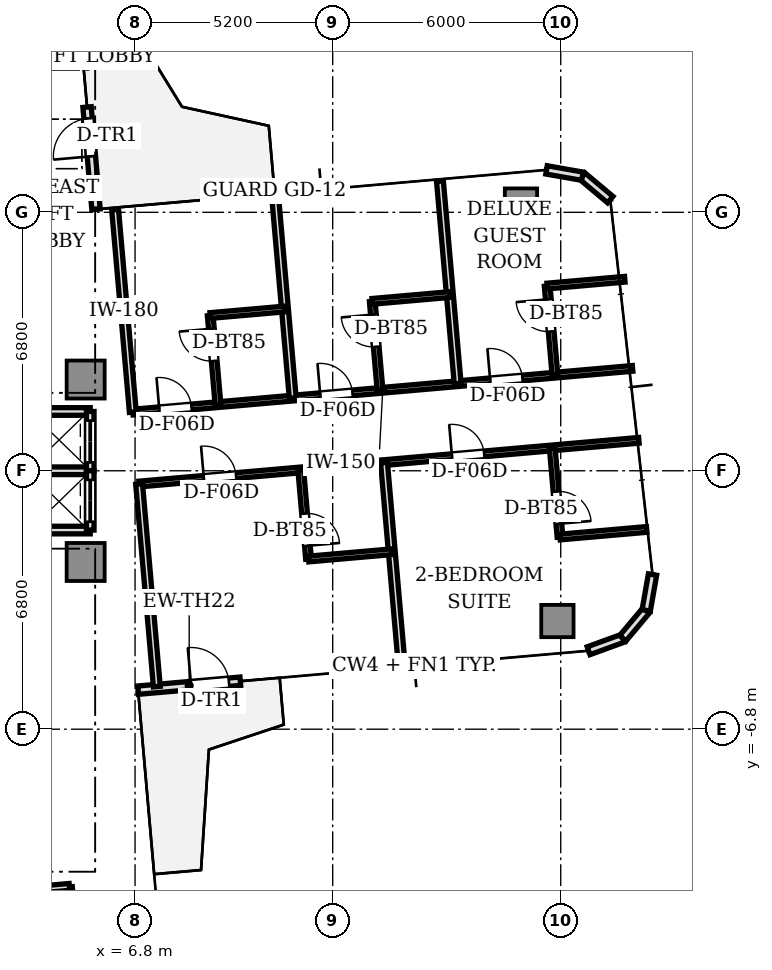
"""IFC4 building model, lengths in metres.
Left out: names, types, materials, properties, quantities, classifications, styles, units other than length and angle.
Written with IfcOpenShell. Run it as: python <this file> out.ifc"""

import sys

from ifc_helpers import new_model, si_unit, direction, frame, frame_2d, origin, origin_2d, place, context, subcontext, project, spatial, rectangle, extrude, source, transform, mapped, element, fill, save


model = new_model("IFC4")
c1 = context("Model", 3, precision=1e-05, world=origin(), true_north=direction((0.0, 1.0)))
c2 = subcontext(c1, "Body", "Model", "MODEL_VIEW")
j1 = project(units=[si_unit("LENGTHUNIT", "METRE"), si_unit("PLANEANGLEUNIT", "RADIAN")], contexts=[c1])
p1 = place(None, origin())
s1 = spatial("IfcSite", under=j1, at=p1, CompositionType="ELEMENT")
p2 = place(p1, origin())
s2 = spatial("IfcBuilding", under=s1, at=p2, CompositionType="ELEMENT")
p3 = place(p2, frame((0.0, 0.0, 167.35)))
s3 = spatial("IfcBuildingStorey", under=s2, at=p3, CompositionType="ELEMENT", Elevation=167.35)
m1 = source(origin(), c2, "Body", "SweptSolid", [
    extrude(rectangle(XDim=1.0, YDim=1.0, at=origin_2d()), origin(), (0.0, 0.0, 1.0), 3.05),
])
for number, where, z_axis, x_axis in (
    (1, (5.5, 2.4, 0.0), (0.0, 0.0, 1.0), (1.0, 0.0, 0.0)),
    (2, (5.5, -2.4, 0.0), (0.0, 0.0, 1.0), (1.0, 0.0, 0.0)),
):
    element("IfcColumn", number, at=place(p3, frame(where, z_axis=z_axis, x_axis=x_axis)), inside=s3, PredefinedType="COLUMN", context=c2, shape_type="MappedRepresentation", body=[
        mapped(m1, transform((0.0, 0.0, 0.0), scale=1.0)),
    ])
m2 = source(origin(), c2, "Body", "SweptSolid", [
    extrude(rectangle(XDim=0.85, YDim=0.85, at=origin_2d()), origin(), (0.0, 0.0, 1.0), 3.05),
])
for number, where, z_axis, x_axis in (
    (3, (17.913, -3.954, 0.0), (0.0, 0.0, 1.0), (1.0, 0.0, 0.0)),
    (4, (16.954, 7.004, 0.0), (0.0, 0.0, 1.0), (1.0, 0.0, 0.0)),
):
    element("IfcColumn", number, at=place(p3, frame(where, z_axis=z_axis, x_axis=x_axis)), inside=s3, PredefinedType="COLUMN", context=c2, shape_type="MappedRepresentation", body=[
        mapped(m2, transform((0.0, 0.0, 0.0), scale=1.0)),
    ])
p4 = place(p3, frame((6.879, -5.772, 0.0), z_axis=(0.0, 0.0, 1.0), x_axis=(0.996193619346, 0.087168071984, 0.0)))
e5 = element("IfcWall", 5, at=p4, inside=s3, PredefinedType="STANDARD", context=c2, shape_type="SweptSolid", body=[
    extrude(rectangle(XDim=2.7, YDim=0.22, at=frame_2d((1.35, 0.0))), origin(), (0.0, 0.0, 1.0), 3.05),
])
p5 = place(p4, frame((1.4, 0.0, 0.0)))
e6 = element("IfcOpeningElement", 6, at=p5, cuts=e5, PredefinedType="OPENING", context=c2, shape_type="SweptSolid", body=[
    extrude(rectangle(XDim=1.0, YDim=2.2, at=frame_2d((0.5, 1.1))), frame((0.0, 0.12, 0.0), z_axis=(0.0, -1.0, 0.0), x_axis=(1.0, 0.0, 0.0)), (0.0, 0.0, 1.0), 0.24),
])
p6 = place(p3, frame((18.734, -4.735, 0.0), z_axis=(0.0, 0.0, 1.0), x_axis=(0.939741306239, 0.34188635151, 0.0)))
e7 = element("IfcWall", 7, at=p6, inside=s3, PredefinedType="STANDARD", context=c2, shape_type="SweptSolid", body=[
    extrude(rectangle(XDim=0.958, YDim=0.22, at=frame_2d((0.479, 0.0))), origin(), (0.0, 0.0, 1.0), 3.05),
])
for number, where, z_axis, x_axis in (
    (8, (19.634, -4.408, 0.0), (0.0, 0.0, 1.0), (0.643, 0.766, 0.0)),
    (9, (20.25, -3.674, 0.0), (0.0, 0.0, 1.0), (0.174, 0.985, 0.0)),
):
    element("IfcWall", number, at=place(p3, frame(where, z_axis=z_axis, x_axis=x_axis)), inside=s3, PredefinedType="STANDARD", context=c2, shape_type="SweptSolid", body=[
        extrude(rectangle(XDim=0.958, YDim=0.22, at=frame_2d((0.479, 0.0))), origin(), (0.0, 0.0, 1.0), 3.05),
    ])
p7 = place(p3, frame((19.304, 7.135, 0.0), z_axis=(0.0, 0.0, 1.0), x_axis=(-0.766001159887, 0.642839189107, 0.0)))
e10 = element("IfcWall", 10, at=p7, inside=s3, PredefinedType="STANDARD", context=c2, shape_type="SweptSolid", body=[
    extrude(rectangle(XDim=0.958, YDim=0.22, at=frame_2d((0.479, 0.0))), origin(), (0.0, 0.0, 1.0), 3.05),
])
p8 = place(p3, frame((18.57, 7.75, 0.0), z_axis=(0.0, 0.0, 1.0), x_axis=(-0.984770724397, 0.173858046606, 0.0)))
e11 = element("IfcWall", 11, at=p8, inside=s3, PredefinedType="STANDARD", context=c2, shape_type="SweptSolid", body=[
    extrude(rectangle(XDim=0.958, YDim=0.22, at=frame_2d((0.479, 0.0))), origin(), (0.0, 0.0, 1.0), 3.05),
])
p9 = place(p3, frame((5.772, 6.879, 0.0), z_axis=(0.0, 0.0, 1.0), x_axis=(-0.087168071984, 0.996193619346, 0.0)))
e12 = element("IfcWall", 12, at=p9, inside=s3, PredefinedType="STANDARD", context=c2, shape_type="SweptSolid", body=[
    extrude(rectangle(XDim=2.7, YDim=0.22, at=frame_2d((1.35, 0.0))), origin(), (0.0, 0.0, 1.0), 3.05),
])
p10 = place(p9, frame((1.4, 0.0, 0.0)))
e13 = element("IfcOpeningElement", 13, at=p10, cuts=e12, PredefinedType="OPENING", context=c2, shape_type="SweptSolid", body=[
    extrude(rectangle(XDim=1.0, YDim=2.2, at=frame_2d((0.5, 1.1))), frame((0.0, 0.12, 0.0), z_axis=(0.0, -1.0, 0.0), x_axis=(1.0, 0.0, 0.0)), (0.0, 0.0, 1.0), 0.24),
])
for number, where, z_axis, x_axis in (
    (14, (3.98, 1.56, 0.0), (0.0, 0.0, 1.0), (1.0, 0.0, 0.0)),
    (15, (3.98, -1.56, 0.0), (0.0, 0.0, 1.0), (1.0, 0.0, 0.0)),
    (16, (3.98, 0.0, 0.0), (0.0, 0.0, 1.0), (1.0, 0.0, 0.0)),
):
    element("IfcWall", number, at=place(p3, frame(where, z_axis=z_axis, x_axis=x_axis)), inside=s3, PredefinedType="SOLIDWALL", context=c2, shape_type="SweptSolid", body=[
        extrude(rectangle(XDim=1.64, YDim=0.2, at=frame_2d((0.82, 0.0))), origin(), (0.0, 0.0, 1.0), 2.6),
    ])
p11 = place(p3, frame((5.62, 0.0, 0.0), z_axis=(0.0, 0.0, 1.0), x_axis=(0.0, 1.0, 0.0)))
e17 = element("IfcWall", 17, at=p11, inside=s3, PredefinedType="SOLIDWALL", context=c2, shape_type="SweptSolid", body=[
    extrude(rectangle(XDim=1.56, YDim=0.2, at=frame_2d((0.78, 0.0))), origin(), (0.0, 0.0, 1.0), 2.6),
])
p12 = place(p11, frame((0.22, 0.0, 0.0)))
e18 = element("IfcOpeningElement", 18, at=p12, cuts=e17, PredefinedType="OPENING", context=c2, shape_type="SweptSolid", body=[
    extrude(rectangle(XDim=1.1, YDim=2.2, at=frame_2d((0.55, 1.1))), frame((0.0, 0.11, 0.0), z_axis=(0.0, -1.0, 0.0), x_axis=(1.0, 0.0, 0.0)), (0.0, 0.0, 1.0), 0.22),
])
p13 = place(p3, frame((5.62, -1.56, 0.0), z_axis=(0.0, 0.0, 1.0), x_axis=(0.0, 1.0, 0.0)))
e19 = element("IfcWall", 19, at=p13, inside=s3, PredefinedType="SOLIDWALL", context=c2, shape_type="SweptSolid", body=[
    extrude(rectangle(XDim=1.56, YDim=0.2, at=frame_2d((0.78, 0.0))), origin(), (0.0, 0.0, 1.0), 2.6),
])
p14 = place(p13, frame((0.22, 0.0, 0.0)))
e20 = element("IfcOpeningElement", 20, at=p14, cuts=e19, PredefinedType="OPENING", context=c2, shape_type="SweptSolid", body=[
    extrude(rectangle(XDim=1.1, YDim=2.2, at=frame_2d((0.55, 1.1))), frame((0.0, 0.11, 0.0), z_axis=(0.0, -1.0, 0.0), x_axis=(1.0, 0.0, 0.0)), (0.0, 0.0, 1.0), 0.22),
])
p15 = place(p3, frame((6.741, 1.543, 0.0), z_axis=(0.0, 0.0, 1.0), x_axis=(0.996195062465, 0.087151577845, 0.0)))
e21 = element("IfcWall", 21, at=p15, inside=s3, PredefinedType="PARTITIONING", context=c2, shape_type="SweptSolid", body=[
    extrude(rectangle(XDim=13.2, YDim=0.15, at=frame_2d((6.6, 0.0))), origin(), (0.0, 0.0, 1.0), 2.6),
])
p16 = place(p15, frame((0.7, 0.0, 0.0)))
e22 = element("IfcOpeningElement", 22, at=p16, cuts=e21, PredefinedType="OPENING", context=c2, shape_type="SweptSolid", body=[
    extrude(rectangle(XDim=0.85, YDim=2.1, at=frame_2d((0.425, 1.05))), frame((0.0, 0.085, 0.0), z_axis=(0.0, -1.0, 0.0), x_axis=(1.0, 0.0, 0.0)), (0.0, 0.0, 1.0), 0.17),
])
p17 = place(p15, frame((4.952, 0.0, 0.0)))
e23 = element("IfcOpeningElement", 23, at=p17, cuts=e21, PredefinedType="OPENING", context=c2, shape_type="SweptSolid", body=[
    extrude(rectangle(XDim=0.85, YDim=2.1, at=frame_2d((0.425, 1.05))), frame((0.0, 0.085, 0.0), z_axis=(0.0, -1.0, 0.0), x_axis=(1.0, 0.0, 0.0)), (0.0, 0.0, 1.0), 0.17),
])
p18 = place(p15, frame((9.44, 0.0, 0.0)))
e24 = element("IfcOpeningElement", 24, at=p18, cuts=e21, PredefinedType="OPENING", context=c2, shape_type="SweptSolid", body=[
    extrude(rectangle(XDim=0.85, YDim=2.1, at=frame_2d((0.425, 1.05))), frame((0.0, 0.085, 0.0), z_axis=(0.0, -1.0, 0.0), x_axis=(1.0, 0.0, 0.0)), (0.0, 0.0, 1.0), 0.17),
])
p19 = place(p3, frame((6.907, -0.349, 0.0), z_axis=(0.0, 0.0, 1.0), x_axis=(0.996195062465, 0.087151577845, 0.0)))
e25 = element("IfcWall", 25, at=p19, inside=s3, PredefinedType="PARTITIONING", context=c2, shape_type="SweptSolid", body=[
    extrude(rectangle(XDim=13.2, YDim=0.15, at=frame_2d((6.6, 0.0))), origin(), (0.0, 0.0, 1.0), 2.6),
])
p20 = place(p19, frame((1.71, 0.0, 0.0)))
e26 = element("IfcOpeningElement", 26, at=p20, cuts=e25, PredefinedType="OPENING", context=c2, shape_type="SweptSolid", body=[
    extrude(rectangle(XDim=0.85, YDim=2.1, at=frame_2d((0.425, 1.05))), frame((0.0, 0.085, 0.0), z_axis=(0.0, -1.0, 0.0), x_axis=(1.0, 0.0, 0.0)), (0.0, 0.0, 1.0), 0.17),
])
p21 = place(p19, frame((8.264, 0.0, 0.0)))
e27 = element("IfcOpeningElement", 27, at=p21, cuts=e25, PredefinedType="OPENING", context=c2, shape_type="SweptSolid", body=[
    extrude(rectangle(XDim=0.85, YDim=2.1, at=frame_2d((0.425, 1.05))), frame((0.0, 0.085, 0.0), z_axis=(0.0, -1.0, 0.0), x_axis=(1.0, 0.0, 0.0)), (0.0, 0.0, 1.0), 0.17),
])
for number, where, z_axis, x_axis in (
    (28, (6.741, 1.543, 0.0), (0.0, 0.0, 1.0), (-0.087, 0.996, 0.0)),
    (29, (7.373, -5.679, 0.0), (0.0, 0.0, 1.0), (-0.087, 0.996, 0.0)),
    (30, (10.949, 1.912, 0.0), (0.0, 0.0, 1.0), (-0.087, 0.996, 0.0)),
):
    element("IfcWall", number, at=place(p3, frame(where, z_axis=z_axis, x_axis=x_axis)), inside=s3, PredefinedType="PARTITIONING", context=c2, shape_type="SweptSolid", body=[
        extrude(rectangle(XDim=5.35, YDim=0.18, at=frame_2d((2.675, 0.0))), origin(), (0.0, 0.0, 1.0), 2.6),
    ])
p22 = place(p3, frame((8.983, 1.74, 0.0), z_axis=(0.0, 0.0, 1.0), x_axis=(-0.087224846905, 0.996188649846, 0.0)))
e31 = element("IfcWall", 31, at=p22, inside=s3, PredefinedType="PARTITIONING", context=c2, shape_type="SweptSolid", body=[
    extrude(rectangle(XDim=2.354, YDim=0.15, at=frame_2d((1.177, 0.0))), origin(), (0.0, 0.0, 1.0), 2.6),
])
p23 = place(p22, frame((1.154, 0.0, 0.0)))
e32 = element("IfcOpeningElement", 32, at=p23, cuts=e31, PredefinedType="OPENING", context=c2, shape_type="SweptSolid", body=[
    extrude(rectangle(XDim=0.85, YDim=2.1, at=frame_2d((0.425, 1.05))), frame((0.0, 0.085, 0.0), z_axis=(0.0, -1.0, 0.0), x_axis=(1.0, 0.0, 0.0)), (0.0, 0.0, 1.0), 0.17),
])
p24 = place(p3, frame((8.777, 4.084, 0.0), z_axis=(0.0, 0.0, 1.0), x_axis=(0.996191703625, 0.087189962887, 0.0)))
e33 = element("IfcWall", 33, at=p24, inside=s3, PredefinedType="PARTITIONING", context=c2, shape_type="SweptSolid", body=[
    extrude(rectangle(XDim=1.974, YDim=0.15, at=frame_2d((0.987, 0.0))), origin(), (0.0, 0.0, 1.0), 2.6),
])
p25 = place(p3, frame((15.289, 2.291, 0.0), z_axis=(0.0, 0.0, 1.0), x_axis=(-0.087161289348, 0.996194212812, 0.0)))
e34 = element("IfcWall", 34, at=p25, inside=s3, PredefinedType="PARTITIONING", context=c2, shape_type="SweptSolid", body=[
    extrude(rectangle(XDim=5.35, YDim=0.18, at=frame_2d((2.675, 0.0))), origin(), (0.0, 0.0, 1.0), 2.6),
])
p26 = place(p3, frame((13.246, 2.113, 0.0), z_axis=(0.0, 0.0, 1.0), x_axis=(-0.087224846905, 0.996188649846, 0.0)))
e35 = element("IfcWall", 35, at=p26, inside=s3, PredefinedType="PARTITIONING", context=c2, shape_type="SweptSolid", body=[
    extrude(rectangle(XDim=2.354, YDim=0.15, at=frame_2d((1.177, 0.0))), origin(), (0.0, 0.0, 1.0), 2.6),
])
p27 = place(p26, frame((1.154, 0.0, 0.0)))
e36 = element("IfcOpeningElement", 36, at=p27, cuts=e35, PredefinedType="OPENING", context=c2, shape_type="SweptSolid", body=[
    extrude(rectangle(XDim=0.85, YDim=2.1, at=frame_2d((0.425, 1.05))), frame((0.0, 0.085, 0.0), z_axis=(0.0, -1.0, 0.0), x_axis=(1.0, 0.0, 0.0)), (0.0, 0.0, 1.0), 0.17),
])
p28 = place(p3, frame((13.041, 4.458, 0.0), z_axis=(0.0, 0.0, 1.0), x_axis=(0.99619307114, 0.087174336889, 0.0)))
e37 = element("IfcWall", 37, at=p28, inside=s3, PredefinedType="PARTITIONING", context=c2, shape_type="SweptSolid", body=[
    extrude(rectangle(XDim=2.05, YDim=0.15, at=frame_2d((1.025, 0.0))), origin(), (0.0, 0.0, 1.0), 2.6),
])
p29 = place(p3, frame((17.849, 2.515, 0.0), z_axis=(0.0, 0.0, 1.0), x_axis=(-0.087121918963, 0.996197656711, 0.0)))
e38 = element("IfcWall", 38, at=p29, inside=s3, PredefinedType="PARTITIONING", context=c2, shape_type="SweptSolid", body=[
    extrude(rectangle(XDim=2.354, YDim=0.15, at=frame_2d((1.177, 0.0))), origin(), (0.0, 0.0, 1.0), 2.6),
])
p30 = place(p29, frame((1.154, 0.0, 0.0)))
e39 = element("IfcOpeningElement", 39, at=p30, cuts=e38, PredefinedType="OPENING", context=c2, shape_type="SweptSolid", body=[
    extrude(rectangle(XDim=0.85, YDim=2.1, at=frame_2d((0.425, 1.05))), frame((0.0, 0.085, 0.0), z_axis=(0.0, -1.0, 0.0), x_axis=(1.0, 0.0, 0.0)), (0.0, 0.0, 1.0), 0.17),
])
p31 = place(p3, frame((17.644, 4.86, 0.0), z_axis=(0.0, 0.0, 1.0), x_axis=(0.99619307114, 0.087174336889, 0.0)))
e40 = element("IfcWall", 40, at=p31, inside=s3, PredefinedType="PARTITIONING", context=c2, shape_type="SweptSolid", body=[
    extrude(rectangle(XDim=2.05, YDim=0.15, at=frame_2d((1.025, 0.0))), origin(), (0.0, 0.0, 1.0), 2.6),
])
p32 = place(p3, frame((13.35, 0.214, 0.0), z_axis=(0.0, 0.0, 1.0), x_axis=(0.087161289348, -0.996194212812, 0.0)))
e41 = element("IfcWall", 41, at=p32, inside=s3, PredefinedType="PARTITIONING", context=c2, shape_type="SweptSolid", body=[
    extrude(rectangle(XDim=5.35, YDim=0.18, at=frame_2d((2.675, 0.0))), origin(), (0.0, 0.0, 1.0), 2.6),
])
p33 = place(p3, frame((11.159, 0.023, 0.0), z_axis=(0.0, 0.0, 1.0), x_axis=(0.087224846905, -0.996188649846, 0.0)))
e42 = element("IfcWall", 42, at=p33, inside=s3, PredefinedType="PARTITIONING", context=c2, shape_type="SweptSolid", body=[
    extrude(rectangle(XDim=2.354, YDim=0.15, at=frame_2d((1.177, 0.0))), origin(), (0.0, 0.0, 1.0), 2.6),
])
p34 = place(p33, frame((1.154, 0.0, 0.0)))
e43 = element("IfcOpeningElement", 43, at=p34, cuts=e42, PredefinedType="OPENING", context=c2, shape_type="SweptSolid", body=[
    extrude(rectangle(XDim=0.85, YDim=2.1, at=frame_2d((0.425, 1.05))), frame((0.0, 0.085, 0.0), z_axis=(0.0, -1.0, 0.0), x_axis=(1.0, 0.0, 0.0)), (0.0, 0.0, 1.0), 0.17),
])
p35 = place(p3, frame((11.365, -2.322, 0.0), z_axis=(0.0, 0.0, 1.0), x_axis=(0.996195042958, 0.087151800816, 0.0)))
e44 = element("IfcWall", 44, at=p35, inside=s3, PredefinedType="PARTITIONING", context=c2, shape_type="SweptSolid", body=[
    extrude(rectangle(XDim=2.199, YDim=0.15, at=frame_2d((1.1, 0.0))), origin(), (0.0, 0.0, 1.0), 2.6),
])
p36 = place(p3, frame((17.776, 0.602, 0.0), z_axis=(0.0, 0.0, 1.0), x_axis=(0.087224846905, -0.996188649846, 0.0)))
e45 = element("IfcWall", 45, at=p36, inside=s3, PredefinedType="PARTITIONING", context=c2, shape_type="SweptSolid", body=[
    extrude(rectangle(XDim=2.354, YDim=0.15, at=frame_2d((1.177, 0.0))), origin(), (0.0, 0.0, 1.0), 2.57),
])
p37 = place(p36, frame((1.154, 0.0, 0.0)))
e46 = element("IfcOpeningElement", 46, at=p37, cuts=e45, PredefinedType="OPENING", context=c2, shape_type="SweptSolid", body=[
    extrude(rectangle(XDim=0.85, YDim=2.1, at=frame_2d((0.425, 1.05))), frame((0.0, 0.085, 0.0), z_axis=(0.0, -1.0, 0.0), x_axis=(1.0, 0.0, 0.0)), (0.0, 0.0, 1.0), 0.17),
])
p38 = place(p3, frame((17.981, -1.743, 0.0), z_axis=(0.0, 0.0, 1.0), x_axis=(0.996196032585, 0.087140488075, 0.0)))
e47 = element("IfcWall", 47, at=p38, inside=s3, PredefinedType="PARTITIONING", context=c2, shape_type="SweptSolid", body=[
    extrude(rectangle(XDim=2.289, YDim=0.15, at=frame_2d((1.145, 0.0))), origin(), (0.0, 0.0, 1.0), 2.6),
])
p39 = place(p3, frame((5.073, -10.949, 0.0), z_axis=(0.0, 0.0, 1.0), x_axis=(0.087199729468, -0.996190848774, 0.0)))
e48 = element("IfcWall", 48, at=p39, inside=s3, PredefinedType="PARTITIONING", context=c2, shape_type="SweptSolid", body=[
    extrude(rectangle(XDim=4.25, YDim=0.15, at=frame_2d((2.125, 0.0))), origin(), (0.0, 0.0, 1.0), 2.6),
])
p40 = place(p39, frame((0.503, 0.0, 0.0)))
e49 = element("IfcOpeningElement", 49, at=p40, cuts=e48, PredefinedType="OPENING", context=c2, shape_type="SweptSolid", body=[
    extrude(rectangle(XDim=0.85, YDim=2.1, at=frame_2d((0.425, 1.05))), frame((0.0, 0.085, 0.0), z_axis=(0.0, -1.0, 0.0), x_axis=(1.0, 0.0, 0.0)), (0.0, 0.0, 1.0), 0.17),
])
p41 = place(p39, frame((2.628, 0.0, 0.0)))
e50 = element("IfcOpeningElement", 50, at=p41, cuts=e48, PredefinedType="OPENING", context=c2, shape_type="SweptSolid", body=[
    extrude(rectangle(XDim=0.85, YDim=2.1, at=frame_2d((0.425, 1.05))), frame((0.0, 0.085, 0.0), z_axis=(0.0, -1.0, 0.0), x_axis=(1.0, 0.0, 0.0)), (0.0, 0.0, 1.0), 0.17),
])
p42 = place(p3, frame((-5.287, -11.856, 0.0), z_axis=(0.0, 0.0, 1.0), x_axis=(0.996194023261, 0.087163455754, 0.0)))
e51 = element("IfcWall", 51, at=p42, inside=s3, PredefinedType="PARTITIONING", context=c2, shape_type="SweptSolid", body=[
    extrude(rectangle(XDim=10.4, YDim=0.18, at=frame_2d((5.2, 0.0))), origin(), (0.0, 0.0, 1.0), 2.6),
])
m3 = source(origin(), c2, "Body", "SweptSolid", [
    extrude(rectangle(XDim=1.0, YDim=0.05, at=origin_2d()), origin(), (0.0, 0.0, 1.0), 2.2),
])
p43 = place(p5, frame((0.5, 0.0, 0.0)))
e52 = element("IfcDoor", 52, at=p43, inside=s3, OperationType="SINGLE_SWING_LEFT", PredefinedType="DOOR", context=c2, shape_type="MappedRepresentation", body=[
    mapped(m3, transform((0.0, 0.0, 0.0), scale=1.0)),
])
fill(e6, e52)
p44 = place(p10, frame((0.5, 0.0, 0.0)))
e53 = element("IfcDoor", 53, at=p44, inside=s3, OperationType="SINGLE_SWING_LEFT", PredefinedType="DOOR", context=c2, shape_type="MappedRepresentation", body=[
    mapped(m3, transform((0.0, 0.0, 0.0), scale=1.0)),
])
fill(e13, e53)
m4 = source(origin(), c2, "Body", "SweptSolid", [
    extrude(rectangle(XDim=1.1, YDim=0.05, at=origin_2d()), origin(), (0.0, 0.0, 1.0), 2.2),
])
p45 = place(p12, frame((0.55, 0.0, 0.0)))
e54 = element("IfcDoor", 54, at=p45, inside=s3, OperationType="DOUBLE_DOOR_SLIDING", PredefinedType="DOOR", context=c2, shape_type="MappedRepresentation", body=[
    mapped(m4, transform((0.0, 0.0, 0.0), scale=1.0)),
])
fill(e18, e54)
p46 = place(p14, frame((0.55, 0.0, 0.0)))
e55 = element("IfcDoor", 55, at=p46, inside=s3, OperationType="DOUBLE_DOOR_SLIDING", PredefinedType="DOOR", context=c2, shape_type="MappedRepresentation", body=[
    mapped(m4, transform((0.0, 0.0, 0.0), scale=1.0)),
])
fill(e20, e55)
m5 = source(origin(), c2, "Body", "SweptSolid", [
    extrude(rectangle(XDim=0.85, YDim=0.05, at=origin_2d()), origin(), (0.0, 0.0, 1.0), 2.1),
])
p47 = place(p23, frame((0.425, 0.0, 0.0)))
e56 = element("IfcDoor", 56, at=p47, inside=s3, OperationType="SINGLE_SWING_RIGHT", PredefinedType="DOOR", context=c2, shape_type="MappedRepresentation", body=[
    mapped(m5, transform((0.0, 0.0, 0.0), scale=1.0)),
])
fill(e32, e56)
p48 = place(p16, frame((0.425, 0.0, 0.0)))
e57 = element("IfcDoor", 57, at=p48, inside=s3, OperationType="SINGLE_SWING_LEFT", PredefinedType="DOOR", context=c2, shape_type="MappedRepresentation", body=[
    mapped(m5, transform((0.0, 0.0, 0.0), scale=1.0)),
])
fill(e22, e57)
p49 = place(p27, frame((0.425, 0.0, 0.0)))
e58 = element("IfcDoor", 58, at=p49, inside=s3, OperationType="SINGLE_SWING_RIGHT", PredefinedType="DOOR", context=c2, shape_type="MappedRepresentation", body=[
    mapped(m5, transform((0.0, 0.0, 0.0), scale=1.0)),
])
fill(e36, e58)
p50 = place(p17, frame((0.425, 0.0, 0.0)))
e59 = element("IfcDoor", 59, at=p50, inside=s3, OperationType="SINGLE_SWING_LEFT", PredefinedType="DOOR", context=c2, shape_type="MappedRepresentation", body=[
    mapped(m5, transform((0.0, 0.0, 0.0), scale=1.0)),
])
fill(e23, e59)
p51 = place(p30, frame((0.425, 0.0, 0.0)))
e60 = element("IfcDoor", 60, at=p51, inside=s3, OperationType="SINGLE_SWING_RIGHT", PredefinedType="DOOR", context=c2, shape_type="MappedRepresentation", body=[
    mapped(m5, transform((0.0, 0.0, 0.0), scale=1.0)),
])
fill(e39, e60)
p52 = place(p18, frame((0.425, 0.0, 0.0)))
e61 = element("IfcDoor", 61, at=p52, inside=s3, OperationType="SINGLE_SWING_LEFT", PredefinedType="DOOR", context=c2, shape_type="MappedRepresentation", body=[
    mapped(m5, transform((0.0, 0.0, 0.0), scale=1.0)),
])
fill(e24, e61)
p53 = place(p34, frame((0.425, 0.0, 0.0)))
e62 = element("IfcDoor", 62, at=p53, inside=s3, OperationType="SINGLE_SWING_RIGHT", PredefinedType="DOOR", context=c2, shape_type="MappedRepresentation", body=[
    mapped(m5, transform((0.0, 0.0, 0.0), scale=1.0)),
])
fill(e43, e62)
p54 = place(p20, frame((0.425, 0.0, 0.0)))
e63 = element("IfcDoor", 63, at=p54, inside=s3, OperationType="SINGLE_SWING_LEFT", PredefinedType="DOOR", context=c2, shape_type="MappedRepresentation", body=[
    mapped(m5, transform((0.0, 0.0, 0.0), scale=1.0)),
])
fill(e26, e63)
p55 = place(p37, frame((0.425, 0.0, 0.0)))
e64 = element("IfcDoor", 64, at=p55, inside=s3, OperationType="SINGLE_SWING_RIGHT", PredefinedType="DOOR", context=c2, shape_type="MappedRepresentation", body=[
    mapped(m5, transform((0.0, 0.0, 0.0), scale=1.0)),
])
fill(e46, e64)
p56 = place(p21, frame((0.425, 0.0, 0.0)))
e65 = element("IfcDoor", 65, at=p56, inside=s3, OperationType="SINGLE_SWING_LEFT", PredefinedType="DOOR", context=c2, shape_type="MappedRepresentation", body=[
    mapped(m5, transform((0.0, 0.0, 0.0), scale=1.0)),
])
fill(e27, e65)
save(model, sys.argv[1])
